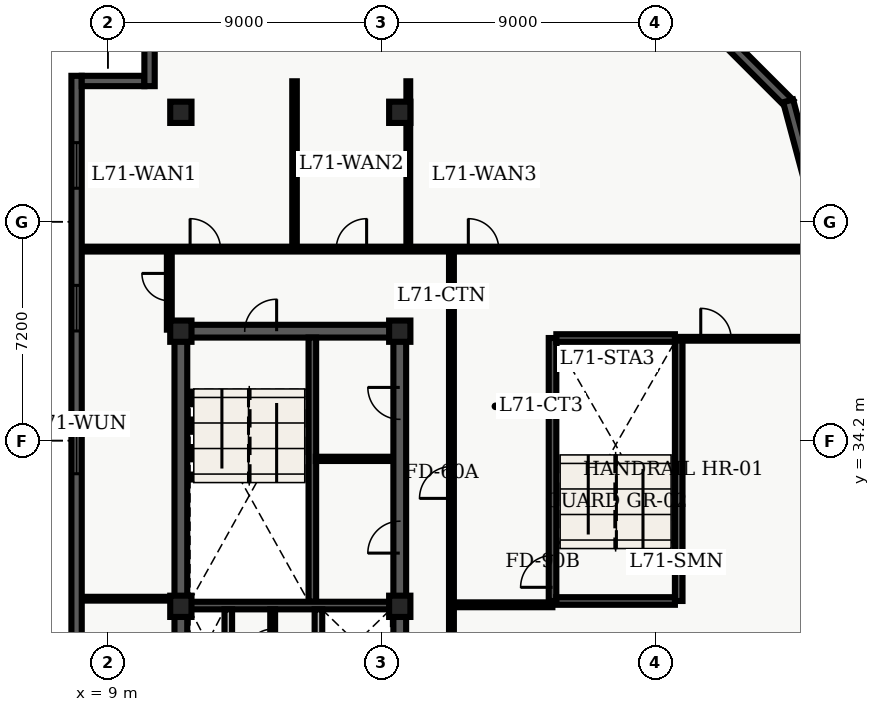
"""IFC4 building model, lengths in metres.
Left out: names, types, materials, properties, quantities, classifications, styles, units other than length and angle.
Written with IfcOpenShell. Run it as: python <this file> out.ifc"""

import sys

from ifc_helpers import new_model, entity, si_unit, converted_unit, direction, frame, origin_with_axes, origin_2d_with_axis, place, context, subcontext, project, spatial, polyline, rectangle, outline, extrude, element, fill, save


model = new_model("IFC4")
c1 = context("Model", 3, precision=1e-05, world=origin_with_axes(), true_north=direction((0.0, 1.0)))
c2 = subcontext(c1, "Body", "Model", "MODEL_VIEW")
j1 = project(units=[si_unit("LENGTHUNIT", "METRE"), converted_unit("PLANEANGLEUNIT", "DEGREE", entity("IfcPlaneAngleMeasure", 0.017), si_unit("PLANEANGLEUNIT", "RADIAN"), dimensions=[0, 0, 0, 0, 0, 0, 0])], contexts=[c1])
p1 = place(None, origin_with_axes())
s1 = spatial("IfcSite", under=j1, at=p1, CompositionType="ELEMENT")
p2 = place(p1, origin_with_axes())
s2 = spatial("IfcBuilding", under=s1, at=p2, CompositionType="ELEMENT")
p3 = place(p2, frame((0.0, 0.0, 288.0), z_axis=(0.0, 0.0, 1.0), x_axis=(1.0, 0.0, 0.0)))
s3 = spatial("IfcBuildingStorey", under=s2, at=p3, CompositionType="ELEMENT", Elevation=288.0)
p4 = place(p3, frame((11.4, 10.8, 0.0), z_axis=(0.0, 0.0, 1.0), x_axis=(0.0, 1.0, 0.0)))
e1 = element("IfcWall", 1, at=p4, inside=s3, PredefinedType="SHEAR", context=c2, shape_type="SweptSolid", body=[
    extrude(outline(polyline([(0.0, -0.21), (27.0, -0.21), (27.0, 0.21), (0.0, 0.21), (0.0, -0.21)])), origin_with_axes(), (0.0, 0.0, 1.0), 3.66),
])
p5 = place(p3, frame((11.4, 37.8, 0.0), z_axis=(0.0, 0.0, 1.0), x_axis=(1.0, 0.0, 0.0)))
e2 = element("IfcWall", 2, at=p5, inside=s3, PredefinedType="SHEAR", context=c2, shape_type="SweptSolid", body=[
    extrude(outline(polyline([(0.0, -0.21), (7.2, -0.21), (7.2, 0.21), (0.0, 0.21), (0.0, -0.21)])), origin_with_axes(), (0.0, 0.0, 1.0), 3.66),
])
p6 = place(p5, frame((2.625, 0.0, 0.0), z_axis=(0.0, 0.0, 1.0), x_axis=(1.0, 0.0, 0.0)))
e3 = element("IfcOpeningElement", 3, at=p6, cuts=e2, PredefinedType="OPENING", context=c2, shape_type="SweptSolid", body=[
    extrude(rectangle(XDim=1.05, YDim=0.44, at=origin_2d_with_axis()), origin_with_axes(), (0.0, 0.0, 1.0), 2.15),
])
p7 = place(p3, frame((18.6, 24.3, 0.0), z_axis=(0.0, 0.0, 1.0), x_axis=(0.0, 1.0, 0.0)))
e4 = element("IfcWall", 4, at=p7, inside=s3, PredefinedType="SHEAR", context=c2, shape_type="SweptSolid", body=[
    extrude(outline(polyline([(0.0, -0.21), (13.5, -0.21), (13.5, 0.21), (0.0, 0.21), (0.0, -0.21)])), origin_with_axes(), (0.0, 0.0, 1.0), 3.66),
])
p8 = place(p7, frame((6.725, 0.0, 0.0), z_axis=(0.0, 0.0, 1.0), x_axis=(1.0, 0.0, 0.0)))
e5 = element("IfcOpeningElement", 5, at=p8, cuts=e4, PredefinedType="OPENING", context=c2, shape_type="SweptSolid", body=[
    extrude(rectangle(XDim=1.05, YDim=0.44, at=origin_2d_with_axis()), origin_with_axes(), (0.0, 0.0, 1.0), 2.15),
])
p9 = place(p7, frame((11.125, 0.0, 0.0), z_axis=(0.0, 0.0, 1.0), x_axis=(1.0, 0.0, 0.0)))
e6 = element("IfcOpeningElement", 6, at=p9, cuts=e4, PredefinedType="OPENING", context=c2, shape_type="SweptSolid", body=[
    extrude(rectangle(XDim=1.05, YDim=0.44, at=origin_2d_with_axis()), origin_with_axes(), (0.0, 0.0, 1.0), 2.15),
])
p10 = place(p3, frame((15.725, 28.9, 0.0), z_axis=(0.0, 0.0, 1.0), x_axis=(0.0, 1.0, 0.0)))
e7 = element("IfcWall", 7, at=p10, inside=s3, PredefinedType="SHEAR", context=c2, shape_type="SweptSolid", body=[
    extrude(outline(polyline([(0.0, -0.125), (8.69, -0.125), (8.69, 0.125), (0.0, 0.125), (0.0, -0.125)])), origin_with_axes(), (0.0, 0.0, 1.0), 3.66),
])
p11 = place(p3, frame((11.61, 28.775, 0.0), z_axis=(0.0, 0.0, 1.0), x_axis=(1.0, 0.0, 0.0)))
e8 = element("IfcWall", 8, at=p11, inside=s3, PredefinedType="SHEAR", context=c2, shape_type="SweptSolid", body=[
    extrude(outline(polyline([(0.0, -0.125), (6.78, -0.125), (6.78, 0.125), (0.0, 0.125), (0.0, -0.125)])), origin_with_axes(), (0.0, 0.0, 1.0), 3.66),
])
for number, where, z_axis, x_axis in (
    (9, (12.96, 26.45, 0.0), (0.0, 0.0, 1.0), (0.0, 1.0, 0.0)),
    (10, (15.925, 26.45, 0.0), (0.0, 0.0, 1.0), (0.0, 1.0, 0.0)),
):
    element("IfcWall", number, at=place(p3, frame(where, z_axis=z_axis, x_axis=x_axis)), inside=s3, PredefinedType="SOLIDWALL", context=c2, shape_type="SweptSolid", body=[
        extrude(outline(polyline([(0.0, -0.125), (2.2, -0.125), (2.2, 0.125), (0.0, 0.125), (0.0, -0.125)])), origin_with_axes(), (0.0, 0.0, 1.0), 2.7),
    ])
p12 = place(p3, frame((23.625, 28.925, 0.0), z_axis=(0.0, 0.0, 1.0), x_axis=(0.0, 1.0, 0.0)))
e11 = element("IfcWall", 11, at=p12, inside=s3, PredefinedType="SHEAR", context=c2, shape_type="SweptSolid", body=[
    extrude(outline(polyline([(0.0, -0.125), (8.65, -0.125), (8.65, 0.125), (0.0, 0.125), (0.0, -0.125)])), origin_with_axes(), (0.0, 0.0, 1.0), 3.66),
])
p13 = place(p12, frame((0.975, 0.0, 0.0), z_axis=(0.0, 0.0, 1.0), x_axis=(1.0, 0.0, 0.0)))
e12 = element("IfcOpeningElement", 12, at=p13, cuts=e11, PredefinedType="OPENING", context=c2, shape_type="SweptSolid", body=[
    extrude(rectangle(XDim=1.05, YDim=0.27, at=origin_2d_with_axis()), origin_with_axes(), (0.0, 0.0, 1.0), 2.15),
])
p14 = place(p3, frame((27.775, 28.925, 0.0), z_axis=(0.0, 0.0, 1.0), x_axis=(0.0, 1.0, 0.0)))
e13 = element("IfcWall", 13, at=p14, inside=s3, PredefinedType="SHEAR", context=c2, shape_type="SweptSolid", body=[
    extrude(outline(polyline([(0.0, -0.125), (8.65, -0.125), (8.65, 0.125), (0.0, 0.125), (0.0, -0.125)])), origin_with_axes(), (0.0, 0.0, 1.0), 3.66),
])
for number, where, z_axis, x_axis in (
    (14, (23.75, 28.925, 0.0), (0.0, 0.0, 1.0), (1.0, 0.0, 0.0)),
    (15, (23.75, 37.575, 0.0), (0.0, 0.0, 1.0), (1.0, 0.0, 0.0)),
):
    element("IfcWall", number, at=place(p3, frame(where, z_axis=z_axis, x_axis=x_axis)), inside=s3, PredefinedType="SHEAR", context=c2, shape_type="SweptSolid", body=[
        extrude(outline(polyline([(0.0, -0.125), (3.9, -0.125), (3.9, 0.125), (0.0, 0.125), (0.0, -0.125)])), origin_with_axes(), (0.0, 0.0, 1.0), 3.66),
    ])
for number, where, z_axis, x_axis in (
    (16, (11.4, 28.75, 0.0), (0.0, 0.0, 1.0), (1.0, 0.0, 0.0)),
    (17, (11.4, 37.8, 0.0), (0.0, 0.0, 1.0), (1.0, 0.0, 0.0)),
    (18, (11.4, 45.0, 0.0), (0.0, 0.0, 1.0), (1.0, 0.0, 0.0)),
    (19, (18.6, 28.75, 0.0), (0.0, 0.0, 1.0), (1.0, 0.0, 0.0)),
    (20, (18.6, 37.8, 0.0), (0.0, 0.0, 1.0), (1.0, 0.0, 0.0)),
    (21, (18.6, 45.0, 0.0), (0.0, 0.0, 1.0), (1.0, 0.0, 0.0)),
):
    element("IfcColumn", number, at=place(p3, frame(where, z_axis=z_axis, x_axis=x_axis)), inside=s3, PredefinedType="COLUMN", context=c2, shape_type="SweptSolid", body=[
        extrude(rectangle(XDim=0.7, YDim=0.7, at=origin_2d_with_axis()), origin_with_axes(), (0.0, 0.0, 1.0), 3.9),
    ])
p15 = place(p3, frame((14.42, 26.45, 0.0), z_axis=(0.0, 0.0, 1.0), x_axis=(0.0, 1.0, 0.0)))
e22 = element("IfcWall", 22, at=p15, inside=s3, PredefinedType="PARTITIONING", context=c2, shape_type="SweptSolid", body=[
    extrude(outline(polyline([(0.0, -0.08), (2.2, -0.08), (2.2, 0.08), (0.0, 0.08), (0.0, -0.08)])), origin_with_axes(), (0.0, 0.0, 1.0), 2.7),
])
p16 = place(p15, frame((1.1, 0.0, 0.0), z_axis=(0.0, 0.0, 1.0), x_axis=(1.0, 0.0, 0.0)))
e23 = element("IfcOpeningElement", 23, at=p16, cuts=e22, PredefinedType="OPENING", context=c2, shape_type="SweptSolid", body=[
    extrude(rectangle(XDim=0.9, YDim=0.18, at=origin_2d_with_axis()), origin_with_axes(), (0.0, 0.0, 1.0), 2.15),
])
p17 = place(p3, frame((15.84, 33.6, 0.0), z_axis=(0.0, 0.0, 1.0), x_axis=(1.0, 0.0, 0.0)))
e24 = element("IfcWall", 24, at=p17, inside=s3, PredefinedType="PARTITIONING", context=c2, shape_type="SweptSolid", body=[
    extrude(outline(polyline([(0.0, -0.07), (2.46, -0.07), (2.46, 0.07), (0.0, 0.07), (0.0, -0.07)])), origin_with_axes(), (0.0, 0.0, 1.0), 2.7),
])
p18 = place(p3, frame((8.135, 40.5, 0.0), z_axis=(0.0, 0.0, 1.0), x_axis=(1.0, 0.0, 0.0)))
e25 = element("IfcWall", 25, at=p18, inside=s3, PredefinedType="PARTITIONING", context=c2, shape_type="SweptSolid", body=[
    extrude(outline(polyline([(0.0, -0.08), (23.93, -0.08), (23.93, 0.08), (0.0, 0.08), (0.0, -0.08)])), origin_with_axes(), (0.0, 0.0, 1.0), 2.7),
])
p19 = place(p18, frame((4.069, 0.0, 0.0), z_axis=(0.0, 0.0, 1.0), x_axis=(1.0, 0.0, 0.0)))
e26 = element("IfcOpeningElement", 26, at=p19, cuts=e25, PredefinedType="OPENING", context=c2, shape_type="SweptSolid", body=[
    extrude(rectangle(XDim=1.0, YDim=0.18, at=origin_2d_with_axis()), origin_with_axes(), (0.0, 0.0, 1.0), 2.15),
])
p20 = place(p18, frame((8.875, 0.0, 0.0), z_axis=(0.0, 0.0, 1.0), x_axis=(1.0, 0.0, 0.0)))
e27 = element("IfcOpeningElement", 27, at=p20, cuts=e25, PredefinedType="OPENING", context=c2, shape_type="SweptSolid", body=[
    extrude(rectangle(XDim=1.0, YDim=0.18, at=origin_2d_with_axis()), origin_with_axes(), (0.0, 0.0, 1.0), 2.15),
])
p21 = place(p18, frame((13.22, 0.0, 0.0), z_axis=(0.0, 0.0, 1.0), x_axis=(1.0, 0.0, 0.0)))
e28 = element("IfcOpeningElement", 28, at=p21, cuts=e25, PredefinedType="OPENING", context=c2, shape_type="SweptSolid", body=[
    extrude(rectangle(XDim=1.0, YDim=0.18, at=origin_2d_with_axis()), origin_with_axes(), (0.0, 0.0, 1.0), 2.15),
])
p22 = place(p3, frame((20.3, 0.335, 0.0), z_axis=(0.0, 0.0, 1.0), x_axis=(0.0, 1.0, 0.0)))
e29 = element("IfcWall", 29, at=p22, inside=s3, PredefinedType="PARTITIONING", context=c2, shape_type="SweptSolid", body=[
    extrude(outline(polyline([(0.0, -0.08), (40.165, -0.08), (40.165, 0.08), (0.0, 0.08), (0.0, -0.08)])), origin_with_axes(), (0.0, 0.0, 1.0), 2.7),
])
p23 = place(p22, frame((32.49, 0.0, 0.0), z_axis=(0.0, 0.0, 1.0), x_axis=(1.0, 0.0, 0.0)))
e30 = element("IfcOpeningElement", 30, at=p23, cuts=e29, PredefinedType="OPENING", context=c2, shape_type="SweptSolid", body=[
    extrude(rectangle(XDim=1.05, YDim=0.18, at=origin_2d_with_axis()), origin_with_axes(), (0.0, 0.0, 1.0), 2.15),
])
p24 = place(p22, frame((4.537, 0.0, 0.0), z_axis=(0.0, 0.0, 1.0), x_axis=(1.0, 0.0, 0.0)))
e31 = element("IfcOpeningElement", 31, at=p24, cuts=e29, PredefinedType="OPENING", context=c2, shape_type="SweptSolid", body=[
    extrude(rectangle(XDim=1.0, YDim=0.18, at=origin_2d_with_axis()), origin_with_axes(), (0.0, 0.0, 1.0), 2.15),
])
p25 = place(p22, frame((11.911, 0.0, 0.0), z_axis=(0.0, 0.0, 1.0), x_axis=(1.0, 0.0, 0.0)))
e32 = element("IfcOpeningElement", 32, at=p25, cuts=e29, PredefinedType="OPENING", context=c2, shape_type="SweptSolid", body=[
    extrude(rectangle(XDim=1.0, YDim=0.18, at=origin_2d_with_axis()), origin_with_axes(), (0.0, 0.0, 1.0), 2.15),
])
p26 = place(p22, frame((21.874, 0.0, 0.0), z_axis=(0.0, 0.0, 1.0), x_axis=(1.0, 0.0, 0.0)))
e33 = element("IfcOpeningElement", 33, at=p26, cuts=e29, PredefinedType="OPENING", context=c2, shape_type="SweptSolid", body=[
    extrude(rectangle(XDim=1.0, YDim=0.18, at=origin_2d_with_axis()), origin_with_axes(), (0.0, 0.0, 1.0), 2.15),
])
p27 = place(p3, frame((20.3, 28.8, 0.0), z_axis=(0.0, 0.0, 1.0), x_axis=(1.0, 0.0, 0.0)))
e34 = element("IfcWall", 34, at=p27, inside=s3, PredefinedType="PARTITIONING", context=c2, shape_type="SweptSolid", body=[
    extrude(outline(polyline([(0.0, -0.08), (3.32, -0.08), (3.32, 0.08), (0.0, 0.08), (0.0, -0.08)])), origin_with_axes(), (0.0, 0.0, 1.0), 2.7),
])
p28 = place(p3, frame((11.02, 37.85, 0.0), z_axis=(0.0, 0.0, 1.0), x_axis=(0.0, 1.0, 0.0)))
e35 = element("IfcWall", 35, at=p28, inside=s3, PredefinedType="PARTITIONING", context=c2, shape_type="SweptSolid", body=[
    extrude(outline(polyline([(0.0, -0.08), (2.65, -0.08), (2.65, 0.08), (0.0, 0.08), (0.0, -0.08)])), origin_with_axes(), (0.0, 0.0, 1.0), 2.7),
])
p29 = place(p28, frame((1.4, 0.0, 0.0), z_axis=(0.0, 0.0, 1.0), x_axis=(1.0, 0.0, 0.0)))
e36 = element("IfcOpeningElement", 36, at=p29, cuts=e35, PredefinedType="OPENING", context=c2, shape_type="SweptSolid", body=[
    extrude(rectangle(XDim=0.9, YDim=0.18, at=origin_2d_with_axis()), origin_with_axes(), (0.0, 0.0, 1.0), 2.15),
])
p30 = place(p3, frame((8.135, 29.0, 0.0), z_axis=(0.0, 0.0, 1.0), x_axis=(1.0, 0.0, 0.0)))
e37 = element("IfcWall", 37, at=p30, inside=s3, PredefinedType="PARTITIONING", context=c2, shape_type="SweptSolid", body=[
    extrude(outline(polyline([(0.0, -0.062), (3.135, -0.062), (3.135, 0.062), (0.0, 0.062), (0.0, -0.062)])), origin_with_axes(), (0.0, 0.0, 1.0), 2.7),
])
p31 = place(p3, frame((15.139, 40.6, 0.0), z_axis=(0.0, 0.0, 1.0), x_axis=(0.0, 1.0, 0.0)))
e38 = element("IfcWall", 38, at=p31, inside=s3, PredefinedType="PARTITIONING", context=c2, shape_type="SweptSolid", body=[
    extrude(outline(polyline([(0.0, -0.075), (5.42, -0.075), (5.42, 0.075), (0.0, 0.075), (0.0, -0.075)])), origin_with_axes(), (0.0, 0.0, 1.0), 2.7),
])
p32 = place(p3, frame((18.881, 40.6, 0.0), z_axis=(0.0, 0.0, 1.0), x_axis=(0.0, 1.0, 0.0)))
e39 = element("IfcWall", 39, at=p32, inside=s3, PredefinedType="PARTITIONING", context=c2, shape_type="SweptSolid", body=[
    extrude(outline(polyline([(0.0, -0.062), (5.42, -0.062), (5.42, 0.062), (0.0, 0.062), (0.0, -0.062)])), origin_with_axes(), (0.0, 0.0, 1.0), 2.7),
])
p33 = place(p3, frame((27.85, 37.55, 0.0), z_axis=(0.0, 0.0, 1.0), x_axis=(1.0, 0.0, 0.0)))
e40 = element("IfcWall", 40, at=p33, inside=s3, PredefinedType="PARTITIONING", context=c2, shape_type="SweptSolid", body=[
    extrude(outline(polyline([(0.0, -0.062), (4.215, -0.062), (4.215, 0.062), (0.0, 0.062), (0.0, -0.062)])), origin_with_axes(), (0.0, 0.0, 1.0), 2.7),
])
p34 = place(p33, frame((1.15, 0.0, 0.0), z_axis=(0.0, 0.0, 1.0), x_axis=(1.0, 0.0, 0.0)))
e41 = element("IfcOpeningElement", 41, at=p34, cuts=e40, PredefinedType="OPENING", context=c2, shape_type="SweptSolid", body=[
    extrude(rectangle(XDim=1.0, YDim=0.145, at=origin_2d_with_axis()), origin_with_axes(), (0.0, 0.0, 1.0), 2.15),
])
p35 = place(p3, frame((7.97, 2.74, 0.0), z_axis=(0.0, 0.0, 1.0), x_axis=(0.0, 1.0, 0.0)))
e42 = element("IfcWall", 42, at=p35, inside=s3, PredefinedType="SOLIDWALL", context=c2, shape_type="SweptSolid", body=[
    extrude(outline(polyline([(0.0, -0.17), (43.46, -0.17), (43.46, 0.17), (0.0, 0.17), (0.0, -0.17)])), origin_with_axes(), (0.0, 0.0, 1.0), 3.66),
])
p36 = place(p35, frame((2.948, 0.0, 0.45), z_axis=(0.0, 0.0, 1.0), x_axis=(1.0, 0.0, 0.0)))
e43 = element("IfcOpeningElement", 43, at=p36, cuts=e42, PredefinedType="OPENING", context=c2, shape_type="SweptSolid", body=[
    extrude(rectangle(XDim=1.5, YDim=0.36, at=origin_2d_with_axis()), origin_with_axes(), (0.0, 0.0, 1.0), 2.1),
])
p37 = place(p35, frame((7.643, 0.0, 0.45), z_axis=(0.0, 0.0, 1.0), x_axis=(1.0, 0.0, 0.0)))
e44 = element("IfcOpeningElement", 44, at=p37, cuts=e42, PredefinedType="OPENING", context=c2, shape_type="SweptSolid", body=[
    extrude(rectangle(XDim=1.5, YDim=0.36, at=origin_2d_with_axis()), origin_with_axes(), (0.0, 0.0, 1.0), 2.1),
])
p38 = place(p35, frame((12.339, 0.0, 0.45), z_axis=(0.0, 0.0, 1.0), x_axis=(1.0, 0.0, 0.0)))
e45 = element("IfcOpeningElement", 45, at=p38, cuts=e42, PredefinedType="OPENING", context=c2, shape_type="SweptSolid", body=[
    extrude(rectangle(XDim=1.5, YDim=0.36, at=origin_2d_with_axis()), origin_with_axes(), (0.0, 0.0, 1.0), 2.1),
])
p39 = place(p35, frame((21.73, 0.0, 0.45), z_axis=(0.0, 0.0, 1.0), x_axis=(1.0, 0.0, 0.0)))
e46 = element("IfcOpeningElement", 46, at=p39, cuts=e42, PredefinedType="OPENING", context=c2, shape_type="SweptSolid", body=[
    extrude(rectangle(XDim=1.5, YDim=0.36, at=origin_2d_with_axis()), origin_with_axes(), (0.0, 0.0, 1.0), 2.1),
])
p40 = place(p35, frame((31.121, 0.0, 0.45), z_axis=(0.0, 0.0, 1.0), x_axis=(1.0, 0.0, 0.0)))
e47 = element("IfcOpeningElement", 47, at=p40, cuts=e42, PredefinedType="OPENING", context=c2, shape_type="SweptSolid", body=[
    extrude(rectangle(XDim=1.5, YDim=0.36, at=origin_2d_with_axis()), origin_with_axes(), (0.0, 0.0, 1.0), 2.1),
])
p41 = place(p35, frame((35.817, 0.0, 0.45), z_axis=(0.0, 0.0, 1.0), x_axis=(1.0, 0.0, 0.0)))
e48 = element("IfcOpeningElement", 48, at=p41, cuts=e42, PredefinedType="OPENING", context=c2, shape_type="SweptSolid", body=[
    extrude(rectangle(XDim=1.5, YDim=0.36, at=origin_2d_with_axis()), origin_with_axes(), (0.0, 0.0, 1.0), 2.1),
])
p42 = place(p35, frame((40.512, 0.0, 0.45), z_axis=(0.0, 0.0, 1.0), x_axis=(1.0, 0.0, 0.0)))
e49 = element("IfcOpeningElement", 49, at=p42, cuts=e42, PredefinedType="OPENING", context=c2, shape_type="SweptSolid", body=[
    extrude(rectangle(XDim=1.5, YDim=0.36, at=origin_2d_with_axis()), origin_with_axes(), (0.0, 0.0, 1.0), 2.1),
])
p43 = place(p3, frame((8.14, 46.03, 0.0), z_axis=(0.0, 0.0, 1.0), x_axis=(1.0, 0.0, 0.0)))
e50 = element("IfcWall", 50, at=p43, inside=s3, PredefinedType="SOLIDWALL", context=c2, shape_type="SweptSolid", body=[
    extrude(outline(polyline([(0.0, -0.17), (2.06, -0.17), (2.06, 0.17), (0.0, 0.17), (0.0, -0.17)])), origin_with_axes(), (0.0, 0.0, 1.0), 3.66),
])
p44 = place(p3, frame((10.37, 45.86, 0.0), z_axis=(0.0, 0.0, 1.0), x_axis=(0.0, 1.0, 0.0)))
e51 = element("IfcWall", 51, at=p44, inside=s3, PredefinedType="SOLIDWALL", context=c2, shape_type="SweptSolid", body=[
    extrude(outline(polyline([(0.0, -0.17), (2.74, -0.17), (2.74, 0.17), (0.0, 0.17), (0.0, -0.17)])), origin_with_axes(), (0.0, 0.0, 1.0), 3.66),
])
p45 = place(p3, frame((29.066, 47.637, 0.0), z_axis=(0.0, 0.0, 1.0), x_axis=(0.707107, -0.707107, 0.0)))
e52 = element("IfcWall", 52, at=p45, inside=s3, PredefinedType="SOLIDWALL", context=c2, shape_type="SweptSolid", body=[
    extrude(outline(polyline([(0.0, -0.17), (3.333, -0.17), (3.333, 0.17), (0.0, 0.17), (0.0, -0.17)])), origin_with_axes(), (0.0, 0.0, 1.0), 3.66),
])
p46 = place(p3, frame((31.374, 45.375, 0.0), z_axis=(0.0, 0.0, 1.0), x_axis=(0.258671, -0.965965, 0.0)))
e53 = element("IfcWall", 53, at=p46, inside=s3, PredefinedType="SOLIDWALL", context=c2, shape_type="SweptSolid", body=[
    extrude(outline(polyline([(0.0, -0.17), (3.332, -0.17), (3.332, 0.17), (0.0, 0.17), (0.0, -0.17)])), origin_with_axes(), (0.0, 0.0, 1.0), 3.66),
])
p47 = place(p5, frame((2.625, 0.0, 0.0), z_axis=(0.0, 0.0, 1.0), x_axis=(1.0, 0.0, 0.0)))
e54 = element("IfcDoor", 54, at=p47, inside=s3, OperationType="SINGLE_SWING_RIGHT", PredefinedType="DOOR", context=c2, shape_type="SweptSolid", body=[
    extrude(rectangle(XDim=1.05, YDim=0.09, at=origin_2d_with_axis()), origin_with_axes(), (0.0, 0.0, 1.0), 2.15),
])
fill(e3, e54)
p48 = place(p15, frame((1.1, 0.0, 0.0), z_axis=(0.0, 0.0, 1.0), x_axis=(1.0, 0.0, 0.0)))
e55 = element("IfcDoor", 55, at=p48, inside=s3, OperationType="SINGLE_SWING_LEFT", PredefinedType="DOOR", context=c2, shape_type="SweptSolid", body=[
    extrude(rectangle(XDim=0.9, YDim=0.09, at=origin_2d_with_axis()), origin_with_axes(), (0.0, 0.0, 1.0), 2.15),
])
fill(e23, e55)
p49 = place(p7, frame((6.725, 0.0, 0.0), z_axis=(0.0, 0.0, 1.0), x_axis=(1.0, 0.0, 0.0)))
e56 = element("IfcDoor", 56, at=p49, inside=s3, OperationType="SINGLE_SWING_LEFT", PredefinedType="DOOR", context=c2, shape_type="SweptSolid", body=[
    extrude(rectangle(XDim=1.05, YDim=0.09, at=origin_2d_with_axis()), origin_with_axes(), (0.0, 0.0, 1.0), 2.15),
])
fill(e5, e56)
p50 = place(p7, frame((11.125, 0.0, 0.0), z_axis=(0.0, 0.0, 1.0), x_axis=(1.0, 0.0, 0.0)))
e57 = element("IfcDoor", 57, at=p50, inside=s3, OperationType="SINGLE_SWING_RIGHT", PredefinedType="DOOR", context=c2, shape_type="SweptSolid", body=[
    extrude(rectangle(XDim=1.05, YDim=0.09, at=origin_2d_with_axis()), origin_with_axes(), (0.0, 0.0, 1.0), 2.15),
])
fill(e6, e57)
p51 = place(p12, frame((0.975, 0.0, 0.0), z_axis=(0.0, 0.0, 1.0), x_axis=(1.0, 0.0, 0.0)))
e58 = element("IfcDoor", 58, at=p51, inside=s3, OperationType="SINGLE_SWING_LEFT", PredefinedType="DOOR", context=c2, shape_type="SweptSolid", body=[
    extrude(rectangle(XDim=1.05, YDim=0.09, at=origin_2d_with_axis()), origin_with_axes(), (0.0, 0.0, 1.0), 2.15),
])
fill(e12, e58)
p52 = place(p22, frame((32.49, 0.0, 0.0), z_axis=(0.0, 0.0, 1.0), x_axis=(1.0, 0.0, 0.0)))
e59 = element("IfcDoor", 59, at=p52, inside=s3, OperationType="SINGLE_SWING_LEFT", PredefinedType="DOOR", context=c2, shape_type="SweptSolid", body=[
    extrude(rectangle(XDim=1.05, YDim=0.09, at=origin_2d_with_axis()), origin_with_axes(), (0.0, 0.0, 1.0), 2.15),
])
fill(e30, e59)
p53 = place(p28, frame((1.4, 0.0, 0.0), z_axis=(0.0, 0.0, 1.0), x_axis=(1.0, 0.0, 0.0)))
e60 = element("IfcDoor", 60, at=p53, inside=s3, OperationType="SINGLE_SWING_RIGHT", PredefinedType="DOOR", context=c2, shape_type="SweptSolid", body=[
    extrude(rectangle(XDim=0.9, YDim=0.09, at=origin_2d_with_axis()), origin_with_axes(), (0.0, 0.0, 1.0), 2.15),
])
fill(e36, e60)
p54 = place(p18, frame((4.069, 0.0, 0.0), z_axis=(0.0, 0.0, 1.0), x_axis=(1.0, 0.0, 0.0)))
e61 = element("IfcDoor", 61, at=p54, inside=s3, OperationType="SINGLE_SWING_LEFT", PredefinedType="DOOR", context=c2, shape_type="SweptSolid", body=[
    extrude(rectangle(XDim=1.0, YDim=0.09, at=origin_2d_with_axis()), origin_with_axes(), (0.0, 0.0, 1.0), 2.15),
])
fill(e26, e61)
p55 = place(p18, frame((8.875, 0.0, 0.0), z_axis=(0.0, 0.0, 1.0), x_axis=(1.0, 0.0, 0.0)))
e62 = element("IfcDoor", 62, at=p55, inside=s3, OperationType="SINGLE_SWING_RIGHT", PredefinedType="DOOR", context=c2, shape_type="SweptSolid", body=[
    extrude(rectangle(XDim=1.0, YDim=0.09, at=origin_2d_with_axis()), origin_with_axes(), (0.0, 0.0, 1.0), 2.15),
])
fill(e27, e62)
p56 = place(p18, frame((13.22, 0.0, 0.0), z_axis=(0.0, 0.0, 1.0), x_axis=(1.0, 0.0, 0.0)))
e63 = element("IfcDoor", 63, at=p56, inside=s3, OperationType="SINGLE_SWING_LEFT", PredefinedType="DOOR", context=c2, shape_type="SweptSolid", body=[
    extrude(rectangle(XDim=1.0, YDim=0.09, at=origin_2d_with_axis()), origin_with_axes(), (0.0, 0.0, 1.0), 2.15),
])
fill(e28, e63)
p57 = place(p33, frame((1.15, 0.0, 0.0), z_axis=(0.0, 0.0, 1.0), x_axis=(1.0, 0.0, 0.0)))
e64 = element("IfcDoor", 64, at=p57, inside=s3, OperationType="SINGLE_SWING_LEFT", PredefinedType="DOOR", context=c2, shape_type="SweptSolid", body=[
    extrude(rectangle(XDim=1.0, YDim=0.075, at=origin_2d_with_axis()), origin_with_axes(), (0.0, 0.0, 1.0), 2.15),
])
fill(e41, e64)
p58 = place(p35, frame((31.121, 0.0, 0.45), z_axis=(0.0, 0.0, 1.0), x_axis=(1.0, 0.0, 0.0)))
e65 = element("IfcWindow", 65, at=p58, inside=s3, PredefinedType="WINDOW", context=c2, shape_type="SweptSolid", body=[
    extrude(rectangle(XDim=1.5, YDim=0.09, at=origin_2d_with_axis()), origin_with_axes(), (0.0, 0.0, 1.0), 2.1),
])
fill(e47, e65)
p59 = place(p35, frame((35.817, 0.0, 0.45), z_axis=(0.0, 0.0, 1.0), x_axis=(1.0, 0.0, 0.0)))
e66 = element("IfcWindow", 66, at=p59, inside=s3, PredefinedType="WINDOW", context=c2, shape_type="SweptSolid", body=[
    extrude(rectangle(XDim=1.5, YDim=0.09, at=origin_2d_with_axis()), origin_with_axes(), (0.0, 0.0, 1.0), 2.1),
])
fill(e48, e66)
p60 = place(p35, frame((40.512, 0.0, 0.45), z_axis=(0.0, 0.0, 1.0), x_axis=(1.0, 0.0, 0.0)))
e67 = element("IfcWindow", 67, at=p60, inside=s3, PredefinedType="WINDOW", context=c2, shape_type="SweptSolid", body=[
    extrude(rectangle(XDim=1.5, YDim=0.09, at=origin_2d_with_axis()), origin_with_axes(), (0.0, 0.0, 1.0), 2.1),
])
fill(e49, e67)
save(model, sys.argv[1])
